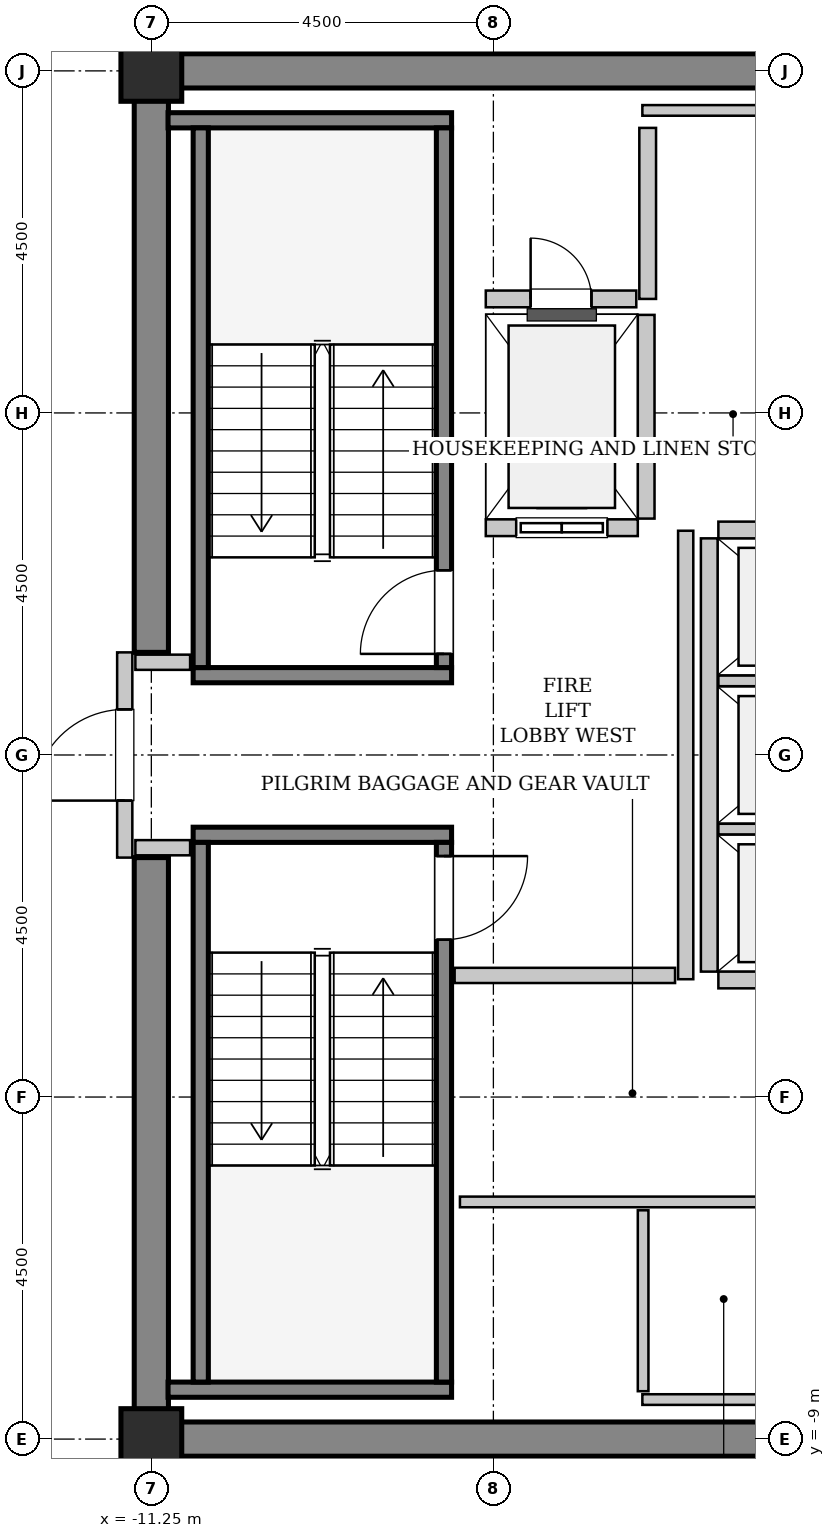
"""IFC4 building model, lengths in metres.
Left out: names, types, materials, properties, quantities, classifications, styles, units other than length and angle.
Written with IfcOpenShell. Run it as: python <this file> out.ifc"""

import sys

from ifc_helpers import new_model, si_unit, direction, frame, frame_2d, origin, origin_2d, place, context, subcontext, project, spatial, rectangle, hollow_rectangle, extrude, source, transform, mapped, element, fill, save


model = new_model("IFC4")
c1 = context("Model", 3, precision=1e-05, world=origin(), true_north=direction((0.0, 1.0)))
c2 = subcontext(c1, "Body", "Model", "MODEL_VIEW")
j1 = project(units=[si_unit("LENGTHUNIT", "METRE"), si_unit("PLANEANGLEUNIT", "RADIAN")], contexts=[c1])
p1 = place(None, origin())
s1 = spatial("IfcSite", under=j1, at=p1, CompositionType="ELEMENT")
p2 = place(p1, origin())
s2 = spatial("IfcBuilding", under=s1, at=p2, CompositionType="ELEMENT")
p3 = place(p2, frame((0.0, 0.0, 276.0)))
s3 = spatial("IfcBuildingStorey", under=s2, at=p3, CompositionType="ELEMENT", Elevation=276.0)
m1 = source(origin(), c2, "Body", "SweptSolid", [
    extrude(rectangle(XDim=9.925, YDim=0.45, at=frame_2d((4.962, 0.0))), origin(), (0.0, 0.0, 1.0), 3.8),
])
for number, where, z_axis, x_axis in (
    (1, (-11.475, 9.0, 0.0), (0.0, 0.0, 1.0), (1.0, 0.0, 0.0)),
    (2, (-11.475, -9.0, 0.0), (0.0, 0.0, 1.0), (1.0, 0.0, 0.0)),
):
    element("IfcWall", number, at=place(p3, frame(where, z_axis=z_axis, x_axis=x_axis)), inside=s3, PredefinedType="SHEAR", context=c2, shape_type="MappedRepresentation", body=[
        mapped(m1, transform((0.0, 0.0, 0.0), x_axis=(1.0, 0.0, 0.0), y_axis=(0.0, 1.0, 0.0), z_axis=(0.0, 0.0, 1.0), scale=1.0)),
    ])
m2 = source(origin(), c2, "Body", "SweptSolid", [
    extrude(rectangle(XDim=7.425, YDim=0.45, at=frame_2d((3.712, 0.0))), origin(), (0.0, 0.0, 1.0), 3.8),
])
for number, where, z_axis, x_axis in (
    (3, (-11.25, -8.775, 0.0), (0.0, 0.0, 1.0), (0.0, 1.0, 0.0)),
    (4, (-11.25, 1.35, 0.0), (0.0, 0.0, 1.0), (0.0, 1.0, 0.0)),
):
    element("IfcWall", number, at=place(p3, frame(where, z_axis=z_axis, x_axis=x_axis)), inside=s3, PredefinedType="SHEAR", context=c2, shape_type="MappedRepresentation", body=[
        mapped(m2, transform((0.0, 0.0, 0.0), x_axis=(1.0, 0.0, 0.0), y_axis=(0.0, 1.0, 0.0), z_axis=(0.0, 0.0, 1.0), scale=1.0)),
    ])
m3 = source(origin(), c2, "Body", "SweptSolid", [
    extrude(hollow_rectangle(XDim=0.8, YDim=0.8, WallThickness=0.04, InnerFilletRadius=0.04, OuterFilletRadius=0.08, at=origin_2d()), origin(), (0.0, 0.0, 1.0), 3.8),
])
for number, where, z_axis, x_axis in (
    (5, (-11.25, -9.0, 0.0), (0.0, 0.0, 1.0), (1.0, 0.0, 0.0)),
    (6, (-11.25, 9.0, 0.0), (0.0, 0.0, 1.0), (1.0, 0.0, 0.0)),
):
    element("IfcColumn", number, at=place(p3, frame(where, z_axis=z_axis, x_axis=x_axis)), inside=s3, PredefinedType="COLUMN", context=c2, shape_type="MappedRepresentation", body=[
        mapped(m3, transform((0.0, 0.0, 0.0), x_axis=(1.0, 0.0, 0.0), y_axis=(0.0, 1.0, 0.0), z_axis=(0.0, 0.0, 1.0), scale=1.0)),
    ])
m4 = source(origin(), c2, "Body", "SweptSolid", [
    extrude(rectangle(XDim=3.4, YDim=0.2, at=frame_2d((1.7, 0.0))), origin(), (0.0, 0.0, 1.0), 3.8),
])
p4 = place(p3, frame((-7.3, 1.05, 0.0), z_axis=(0.0, 0.0, 1.0), x_axis=(-1.0, 0.0, 0.0)))
e7 = element("IfcWall", 7, at=p4, inside=s3, PredefinedType="SOLIDWALL", context=c2, shape_type="MappedRepresentation", body=[
    mapped(m4, transform((0.0, 0.0, 0.0), x_axis=(1.0, 0.0, 0.0), y_axis=(0.0, 1.0, 0.0), z_axis=(0.0, 0.0, 1.0), scale=1.0)),
])
m5 = source(origin(), c2, "Body", "SweptSolid", [
    extrude(rectangle(XDim=3.73, YDim=0.2, at=frame_2d((1.865, 0.0))), origin(), (0.0, 0.0, 1.0), 3.8),
])
p5 = place(p3, frame((-7.3, 8.35, 0.0), z_axis=(0.0, 0.0, 1.0), x_axis=(-1.0, 0.0, 0.0)))
e8 = element("IfcWall", 8, at=p5, inside=s3, PredefinedType="SOLIDWALL", context=c2, shape_type="MappedRepresentation", body=[
    mapped(m5, transform((0.0, 0.0, 0.0), x_axis=(1.0, 0.0, 0.0), y_axis=(0.0, 1.0, 0.0), z_axis=(0.0, 0.0, 1.0), scale=1.0)),
])
m6 = source(origin(), c2, "Body", "SweptSolid", [
    extrude(rectangle(XDim=7.1, YDim=0.2, at=frame_2d((3.55, 0.0))), origin(), (0.0, 0.0, 1.0), 3.8),
])
p6 = place(p3, frame((-7.4, 1.15, 0.0), z_axis=(0.0, 0.0, 1.0), x_axis=(0.0, 1.0, 0.0)))
e9 = element("IfcWall", 9, at=p6, inside=s3, PredefinedType="SOLIDWALL", context=c2, shape_type="MappedRepresentation", body=[
    mapped(m6, transform((0.0, 0.0, 0.0), x_axis=(1.0, 0.0, 0.0), y_axis=(0.0, 1.0, 0.0), z_axis=(0.0, 0.0, 1.0), scale=1.0)),
])
p7 = place(p6, frame((0.18, 0.0, 0.0)))
e10 = element("IfcOpeningElement", 10, at=p7, cuts=e9, PredefinedType="OPENING", context=c2, shape_type="SweptSolid", body=[
    extrude(rectangle(XDim=1.1, YDim=2.15, at=frame_2d((0.55, 1.075))), frame((0.0, 0.11, 0.0), z_axis=(0.0, -1.0, 0.0), x_axis=(1.0, 0.0, 0.0)), (0.0, 0.0, 1.0), 0.22),
])
p8 = place(p3, frame((-10.6, 1.15, 0.0), z_axis=(0.0, 0.0, 1.0), x_axis=(0.0, 1.0, 0.0)))
e11 = element("IfcWall", 11, at=p8, inside=s3, PredefinedType="SOLIDWALL", context=c2, shape_type="MappedRepresentation", body=[
    mapped(m6, transform((0.0, 0.0, 0.0), x_axis=(1.0, 0.0, 0.0), y_axis=(0.0, 1.0, 0.0), z_axis=(0.0, 0.0, 1.0), scale=1.0)),
])
p9 = place(p3, frame((-10.7, -1.05, 0.0), z_axis=(0.0, 0.0, 1.0), x_axis=(1.0, 0.0, 0.0)))
e12 = element("IfcWall", 12, at=p9, inside=s3, PredefinedType="SOLIDWALL", context=c2, shape_type="MappedRepresentation", body=[
    mapped(m4, transform((0.0, 0.0, 0.0), x_axis=(1.0, 0.0, 0.0), y_axis=(0.0, 1.0, 0.0), z_axis=(0.0, 0.0, 1.0), scale=1.0)),
])
p10 = place(p3, frame((-11.03, -8.35, 0.0), z_axis=(0.0, 0.0, 1.0), x_axis=(1.0, 0.0, 0.0)))
e13 = element("IfcWall", 13, at=p10, inside=s3, PredefinedType="SOLIDWALL", context=c2, shape_type="MappedRepresentation", body=[
    mapped(m5, transform((0.0, 0.0, 0.0), x_axis=(1.0, 0.0, 0.0), y_axis=(0.0, 1.0, 0.0), z_axis=(0.0, 0.0, 1.0), scale=1.0)),
])
p11 = place(p3, frame((-10.6, -1.15, 0.0), z_axis=(0.0, 0.0, 1.0), x_axis=(0.0, -1.0, 0.0)))
e14 = element("IfcWall", 14, at=p11, inside=s3, PredefinedType="SOLIDWALL", context=c2, shape_type="MappedRepresentation", body=[
    mapped(m6, transform((0.0, 0.0, 0.0), x_axis=(1.0, 0.0, 0.0), y_axis=(0.0, 1.0, 0.0), z_axis=(0.0, 0.0, 1.0), scale=1.0)),
])
p12 = place(p3, frame((-7.4, -1.15, 0.0), z_axis=(0.0, 0.0, 1.0), x_axis=(0.0, -1.0, 0.0)))
e15 = element("IfcWall", 15, at=p12, inside=s3, PredefinedType="SOLIDWALL", context=c2, shape_type="MappedRepresentation", body=[
    mapped(m6, transform((0.0, 0.0, 0.0), x_axis=(1.0, 0.0, 0.0), y_axis=(0.0, 1.0, 0.0), z_axis=(0.0, 0.0, 1.0), scale=1.0)),
])
p13 = place(p12, frame((0.18, 0.0, 0.0)))
e16 = element("IfcOpeningElement", 16, at=p13, cuts=e15, PredefinedType="OPENING", context=c2, shape_type="SweptSolid", body=[
    extrude(rectangle(XDim=1.1, YDim=2.15, at=frame_2d((0.55, 1.075))), frame((0.0, 0.11, 0.0), z_axis=(0.0, -1.0, 0.0), x_axis=(1.0, 0.0, 0.0)), (0.0, 0.0, 1.0), 0.22),
])
m7 = source(origin(), c2, "Body", "SweptSolid", [
    extrude(rectangle(XDim=2.0, YDim=0.22, at=frame_2d((1.0, 0.0))), origin(), (0.0, 0.0, 1.0), 3.535),
])
p14 = place(p3, frame((-6.85, 2.99, 0.0), z_axis=(0.0, 0.0, 1.0), x_axis=(1.0, 0.0, 0.0)))
e17 = element("IfcWall", 17, at=p14, inside=s3, PredefinedType="SOLIDWALL", context=c2, shape_type="MappedRepresentation", body=[
    mapped(m7, transform((0.0, 0.0, 0.0), x_axis=(1.0, 0.0, 0.0), y_axis=(0.0, 1.0, 0.0), z_axis=(0.0, 0.0, 1.0), scale=1.0)),
])
p15 = place(p14, frame((0.4, 0.0, 0.0)))
e18 = element("IfcOpeningElement", 18, at=p15, cuts=e17, PredefinedType="OPENING", context=c2, shape_type="SweptSolid", body=[
    extrude(rectangle(XDim=1.2, YDim=2.2, at=frame_2d((0.6, 1.1))), frame((0.0, 0.12, 0.0), z_axis=(0.0, -1.0, 0.0), x_axis=(1.0, 0.0, 0.0)), (0.0, 0.0, 1.0), 0.24),
])
m8 = source(origin(), c2, "Body", "SweptSolid", [
    extrude(rectangle(XDim=2.68, YDim=0.22, at=frame_2d((1.34, 0.0))), origin(), (0.0, 0.0, 1.0), 3.535),
])
p16 = place(p3, frame((-4.74, 3.11, 0.0), z_axis=(0.0, 0.0, 1.0), x_axis=(0.0, 1.0, 0.0)))
e19 = element("IfcWall", 19, at=p16, inside=s3, PredefinedType="SOLIDWALL", context=c2, shape_type="MappedRepresentation", body=[
    mapped(m8, transform((0.0, 0.0, 0.0), x_axis=(1.0, 0.0, 0.0), y_axis=(0.0, 1.0, 0.0), z_axis=(0.0, 0.0, 1.0), scale=1.0)),
])
m9 = source(origin(), c2, "Body", "SweptSolid", [
    extrude(rectangle(XDim=5.7, YDim=0.22, at=frame_2d((2.85, 0.0))), origin(), (0.0, 0.0, 1.0), 3.535),
])
p17 = place(p3, frame((-3.91, 2.85, 0.0), z_axis=(0.0, 0.0, 1.0), x_axis=(0.0, -1.0, 0.0)))
e20 = element("IfcWall", 20, at=p17, inside=s3, PredefinedType="SOLIDWALL", context=c2, shape_type="MappedRepresentation", body=[
    mapped(m9, transform((0.0, 0.0, 0.0), x_axis=(1.0, 0.0, 0.0), y_axis=(0.0, 1.0, 0.0), z_axis=(0.0, 0.0, 1.0), scale=1.0)),
])
m10 = source(origin(), c2, "Body", "SweptSolid", [
    extrude(rectangle(XDim=2.13, YDim=0.22, at=frame_2d((1.065, 0.0))), origin(), (0.0, 0.0, 1.0), 3.535),
])
p18 = place(p3, frame((-3.79, -2.96, 0.0), z_axis=(0.0, 0.0, 1.0), x_axis=(1.0, 0.0, 0.0)))
e21 = element("IfcWall", 21, at=p18, inside=s3, PredefinedType="SOLIDWALL", context=c2, shape_type="MappedRepresentation", body=[
    mapped(m10, transform((0.0, 0.0, 0.0), x_axis=(1.0, 0.0, 0.0), y_axis=(0.0, 1.0, 0.0), z_axis=(0.0, 0.0, 1.0), scale=1.0)),
])
m11 = source(origin(), c2, "Body", "SweptSolid", [
    extrude(rectangle(XDim=2.13, YDim=0.14, at=frame_2d((1.065, 0.0))), origin(), (0.0, 0.0, 1.0), 3.535),
])
for number, where, z_axis, x_axis in (
    (22, (-3.79, -0.975, 0.0), (0.0, 0.0, 1.0), (1.0, 0.0, 0.0)),
    (23, (-3.79, 0.975, 0.0), (0.0, 0.0, 1.0), (1.0, 0.0, 0.0)),
):
    element("IfcWall", number, at=place(p3, frame(where, z_axis=z_axis, x_axis=x_axis)), inside=s3, PredefinedType="PARTITIONING", context=c2, shape_type="MappedRepresentation", body=[
        mapped(m11, transform((0.0, 0.0, 0.0), x_axis=(1.0, 0.0, 0.0), y_axis=(0.0, 1.0, 0.0), z_axis=(0.0, 0.0, 1.0), scale=1.0)),
    ])
p19 = place(p3, frame((-1.66, 2.96, 0.0), z_axis=(0.0, 0.0, 1.0), x_axis=(-1.0, 0.0, 0.0)))
e24 = element("IfcWall", 24, at=p19, inside=s3, PredefinedType="SOLIDWALL", context=c2, shape_type="MappedRepresentation", body=[
    mapped(m10, transform((0.0, 0.0, 0.0), x_axis=(1.0, 0.0, 0.0), y_axis=(0.0, 1.0, 0.0), z_axis=(0.0, 0.0, 1.0), scale=1.0)),
])
m12 = source(origin(), c2, "Body", "SweptSolid", [
    extrude(rectangle(XDim=2.25, YDim=0.22, at=frame_2d((1.125, 0.0))), origin(), (0.0, 0.0, 1.0), 3.535),
])
p20 = place(p3, frame((-4.72, 6.0, 0.0), z_axis=(0.0, 0.0, 1.0), x_axis=(0.0, 1.0, 0.0)))
e25 = element("IfcWall", 25, at=p20, inside=s3, PredefinedType="SOLIDWALL", context=c2, shape_type="MappedRepresentation", body=[
    mapped(m12, transform((0.0, 0.0, 0.0), x_axis=(1.0, 0.0, 0.0), y_axis=(0.0, 1.0, 0.0), z_axis=(0.0, 0.0, 1.0), scale=1.0)),
])
m13 = source(origin(), c2, "Body", "SweptSolid", [
    extrude(rectangle(XDim=1.98, YDim=0.22, at=frame_2d((0.99, 0.0))), origin(), (0.0, 0.0, 1.0), 3.535),
])
p21 = place(p3, frame((-6.85, 6.0, 0.0), z_axis=(0.0, 0.0, 1.0), x_axis=(1.0, 0.0, 0.0)))
e26 = element("IfcWall", 26, at=p21, inside=s3, PredefinedType="SOLIDWALL", context=c2, shape_type="MappedRepresentation", body=[
    mapped(m13, transform((0.0, 0.0, 0.0), x_axis=(1.0, 0.0, 0.0), y_axis=(0.0, 1.0, 0.0), z_axis=(0.0, 0.0, 1.0), scale=1.0)),
])
p22 = place(p21, frame((0.59, 0.0, 0.0)))
e27 = element("IfcOpeningElement", 27, at=p22, cuts=e26, PredefinedType="OPENING", context=c2, shape_type="SweptSolid", body=[
    extrude(rectangle(XDim=0.8, YDim=2.0, at=frame_2d((0.4, 1.0))), frame((0.0, 0.12, 0.0), z_axis=(0.0, -1.0, 0.0), x_axis=(1.0, 0.0, 0.0)), (0.0, 0.0, 1.0), 0.24),
])
m14 = source(origin(), c2, "Body", "SweptSolid", [
    extrude(rectangle(XDim=2.7, YDim=0.2, at=frame_2d((1.35, 0.0))), origin(), (0.0, 0.0, 1.0), 2.625),
])
p23 = place(p3, frame((-11.6, -1.35, 0.0), z_axis=(0.0, 0.0, 1.0), x_axis=(0.0, 1.0, 0.0)))
e28 = element("IfcWall", 28, at=p23, inside=s3, PredefinedType="PARTITIONING", context=c2, shape_type="MappedRepresentation", body=[
    mapped(m14, transform((0.0, 0.0, 0.0), x_axis=(1.0, 0.0, 0.0), y_axis=(0.0, 1.0, 0.0), z_axis=(0.0, 0.0, 1.0), scale=1.0)),
])
p24 = place(p23, frame((0.75, 0.0, 0.0)))
e29 = element("IfcOpeningElement", 29, at=p24, cuts=e28, PredefinedType="OPENING", context=c2, shape_type="SweptSolid", body=[
    extrude(rectangle(XDim=1.2, YDim=2.15, at=frame_2d((0.6, 1.075))), frame((0.0, 0.11, 0.0), z_axis=(0.0, -1.0, 0.0), x_axis=(1.0, 0.0, 0.0)), (0.0, 0.0, 1.0), 0.22),
])
m15 = source(origin(), c2, "Body", "SweptSolid", [
    extrude(rectangle(XDim=5.9, YDim=0.2, at=frame_2d((2.95, 0.0))), origin(), (0.0, 0.0, 1.0), 3.535),
])
p25 = place(p3, frame((-4.22, -2.95, 0.0), z_axis=(0.0, 0.0, 1.0), x_axis=(0.0, 1.0, 0.0)))
e30 = element("IfcWall", 30, at=p25, inside=s3, PredefinedType="PARTITIONING", context=c2, shape_type="MappedRepresentation", body=[
    mapped(m15, transform((0.0, 0.0, 0.0), x_axis=(1.0, 0.0, 0.0), y_axis=(0.0, 1.0, 0.0), z_axis=(0.0, 0.0, 1.0), scale=1.0)),
])
m16 = source(origin(), c2, "Body", "SweptSolid", [
    extrude(rectangle(XDim=2.9, YDim=0.2, at=frame_2d((1.45, 0.0))), origin(), (0.0, 0.0, 1.0), 3.535),
])
p26 = place(p3, frame((-7.26, -2.9, 0.0), z_axis=(0.0, 0.0, 1.0), x_axis=(1.0, 0.0, 0.0)))
e31 = element("IfcWall", 31, at=p26, inside=s3, PredefinedType="PARTITIONING", context=c2, shape_type="MappedRepresentation", body=[
    mapped(m16, transform((0.0, 0.0, 0.0), x_axis=(1.0, 0.0, 0.0), y_axis=(0.0, 1.0, 0.0), z_axis=(0.0, 0.0, 1.0), scale=1.0)),
])
m17 = source(origin(), c2, "Body", "SweptSolid", [
    extrude(rectangle(XDim=0.72, YDim=0.2, at=frame_2d((0.36, 0.0))), origin(), (0.0, 0.0, 1.0), 3.535),
])
for number, where, z_axis, x_axis in (
    (32, (-11.46, 1.22, 0.0), (0.0, 0.0, 1.0), (1.0, 0.0, 0.0)),
    (33, (-11.46, -1.22, 0.0), (0.0, 0.0, 1.0), (1.0, 0.0, 0.0)),
):
    element("IfcWall", number, at=place(p3, frame(where, z_axis=z_axis, x_axis=x_axis)), inside=s3, PredefinedType="PARTITIONING", context=c2, shape_type="MappedRepresentation", body=[
        mapped(m17, transform((0.0, 0.0, 0.0), x_axis=(1.0, 0.0, 0.0), y_axis=(0.0, 1.0, 0.0), z_axis=(0.0, 0.0, 1.0), scale=1.0)),
    ])
m18 = source(origin(), c2, "Body", "SweptSolid", [
    extrude(rectangle(XDim=3.15, YDim=0.14, at=frame_2d((1.575, 0.0))), origin(), (0.0, 0.0, 1.0), 3.535),
])
p27 = place(p3, frame((-4.79, 8.48, 0.0), z_axis=(0.0, 0.0, 1.0), x_axis=(1.0, 0.0, 0.0)))
e34 = element("IfcWall", 34, at=p27, inside=s3, PredefinedType="PARTITIONING", context=c2, shape_type="MappedRepresentation", body=[
    mapped(m18, transform((0.0, 0.0, 0.0), x_axis=(1.0, 0.0, 0.0), y_axis=(0.0, 1.0, 0.0), z_axis=(0.0, 0.0, 1.0), scale=1.0)),
])
m19 = source(origin(), c2, "Body", "SweptSolid", [
    extrude(rectangle(XDim=5.55, YDim=0.14, at=frame_2d((2.775, 0.0))), origin(), (0.0, 0.0, 1.0), 3.535),
])
p28 = place(p3, frame((-7.19, -5.88, 0.0), z_axis=(0.0, 0.0, 1.0), x_axis=(1.0, 0.0, 0.0)))
e35 = element("IfcWall", 35, at=p28, inside=s3, PredefinedType="PARTITIONING", context=c2, shape_type="MappedRepresentation", body=[
    mapped(m19, transform((0.0, 0.0, 0.0), x_axis=(1.0, 0.0, 0.0), y_axis=(0.0, 1.0, 0.0), z_axis=(0.0, 0.0, 1.0), scale=1.0)),
])
p29 = place(p3, frame((-4.79, -8.48, 0.0), z_axis=(0.0, 0.0, 1.0), x_axis=(1.0, 0.0, 0.0)))
e36 = element("IfcWall", 36, at=p29, inside=s3, PredefinedType="PARTITIONING", context=c2, shape_type="MappedRepresentation", body=[
    mapped(m18, transform((0.0, 0.0, 0.0), x_axis=(1.0, 0.0, 0.0), y_axis=(0.0, 1.0, 0.0), z_axis=(0.0, 0.0, 1.0), scale=1.0)),
])
m20 = source(origin(), c2, "Body", "SweptSolid", [
    extrude(rectangle(XDim=2.38, YDim=0.14, at=frame_2d((1.19, 0.0))), origin(), (0.0, 0.0, 1.0), 3.535),
])
p30 = place(p3, frame((-4.78, -8.37, 0.0), z_axis=(0.0, 0.0, 1.0), x_axis=(0.0, 1.0, 0.0)))
e37 = element("IfcWall", 37, at=p30, inside=s3, PredefinedType="PARTITIONING", context=c2, shape_type="MappedRepresentation", body=[
    mapped(m20, transform((0.0, 0.0, 0.0), x_axis=(1.0, 0.0, 0.0), y_axis=(0.0, 1.0, 0.0), z_axis=(0.0, 0.0, 1.0), scale=1.0)),
])
m21 = source(origin(), c2, "Body", "SweptSolid", [
    extrude(rectangle(XDim=1.1, YDim=2.15, at=frame_2d((0.55, 1.075))), frame((0.0, 0.025, 0.0), z_axis=(0.0, -1.0, 0.0), x_axis=(1.0, 0.0, 0.0)), (0.0, 0.0, 1.0), 0.05),
])
p31 = place(p7, origin())
e38 = element("IfcDoor", 38, at=p31, inside=s3, OperationType="SINGLE_SWING_LEFT", PredefinedType="DOOR", context=c2, shape_type="MappedRepresentation", body=[
    mapped(m21, transform((0.0, 0.0, 0.0), x_axis=(1.0, 0.0, 0.0), y_axis=(0.0, 1.0, 0.0), z_axis=(0.0, 0.0, 1.0), scale=1.0)),
])
fill(e10, e38)
p32 = place(p13, origin())
e39 = element("IfcDoor", 39, at=p32, inside=s3, OperationType="SINGLE_SWING_LEFT", PredefinedType="DOOR", context=c2, shape_type="MappedRepresentation", body=[
    mapped(m21, transform((0.0, 0.0, 0.0), x_axis=(1.0, 0.0, 0.0), y_axis=(0.0, 1.0, 0.0), z_axis=(0.0, 0.0, 1.0), scale=1.0)),
])
fill(e16, e39)
m22 = source(origin(), c2, "Body", "SweptSolid", [
    extrude(rectangle(XDim=1.2, YDim=2.2, at=frame_2d((0.6, 1.1))), frame((0.0, 0.025, 0.0), z_axis=(0.0, -1.0, 0.0), x_axis=(1.0, 0.0, 0.0)), (0.0, 0.0, 1.0), 0.05),
])
p33 = place(p15, origin())
e40 = element("IfcDoor", 40, at=p33, inside=s3, OperationType="SLIDING_TO_LEFT", PredefinedType="DOOR", context=c2, shape_type="MappedRepresentation", body=[
    mapped(m22, transform((0.0, 0.0, 0.0), x_axis=(1.0, 0.0, 0.0), y_axis=(0.0, 1.0, 0.0), z_axis=(0.0, 0.0, 1.0), scale=1.0)),
])
fill(e18, e40)
m23 = source(origin(), c2, "Body", "SweptSolid", [
    extrude(rectangle(XDim=0.8, YDim=2.0, at=frame_2d((0.4, 1.0))), frame((0.0, 0.025, 0.0), z_axis=(0.0, -1.0, 0.0), x_axis=(1.0, 0.0, 0.0)), (0.0, 0.0, 1.0), 0.05),
])
p34 = place(p22, origin())
e41 = element("IfcDoor", 41, at=p34, inside=s3, OperationType="SINGLE_SWING_LEFT", PredefinedType="TRAPDOOR", context=c2, shape_type="MappedRepresentation", body=[
    mapped(m23, transform((0.0, 0.0, 0.0), x_axis=(1.0, 0.0, 0.0), y_axis=(0.0, 1.0, 0.0), z_axis=(0.0, 0.0, 1.0), scale=1.0)),
])
fill(e27, e41)
m24 = source(origin(), c2, "Body", "SweptSolid", [
    extrude(rectangle(XDim=1.2, YDim=2.15, at=frame_2d((0.6, 1.075))), frame((0.0, 0.025, 0.0), z_axis=(0.0, -1.0, 0.0), x_axis=(1.0, 0.0, 0.0)), (0.0, 0.0, 1.0), 0.05),
])
p35 = place(p24, origin())
e42 = element("IfcDoor", 42, at=p35, inside=s3, OperationType="SINGLE_SWING_LEFT", PredefinedType="DOOR", context=c2, shape_type="MappedRepresentation", body=[
    mapped(m24, transform((0.0, 0.0, 0.0), x_axis=(1.0, 0.0, 0.0), y_axis=(0.0, 1.0, 0.0), z_axis=(0.0, 0.0, 1.0), scale=1.0)),
])
fill(e29, e42)
save(model, sys.argv[1])
